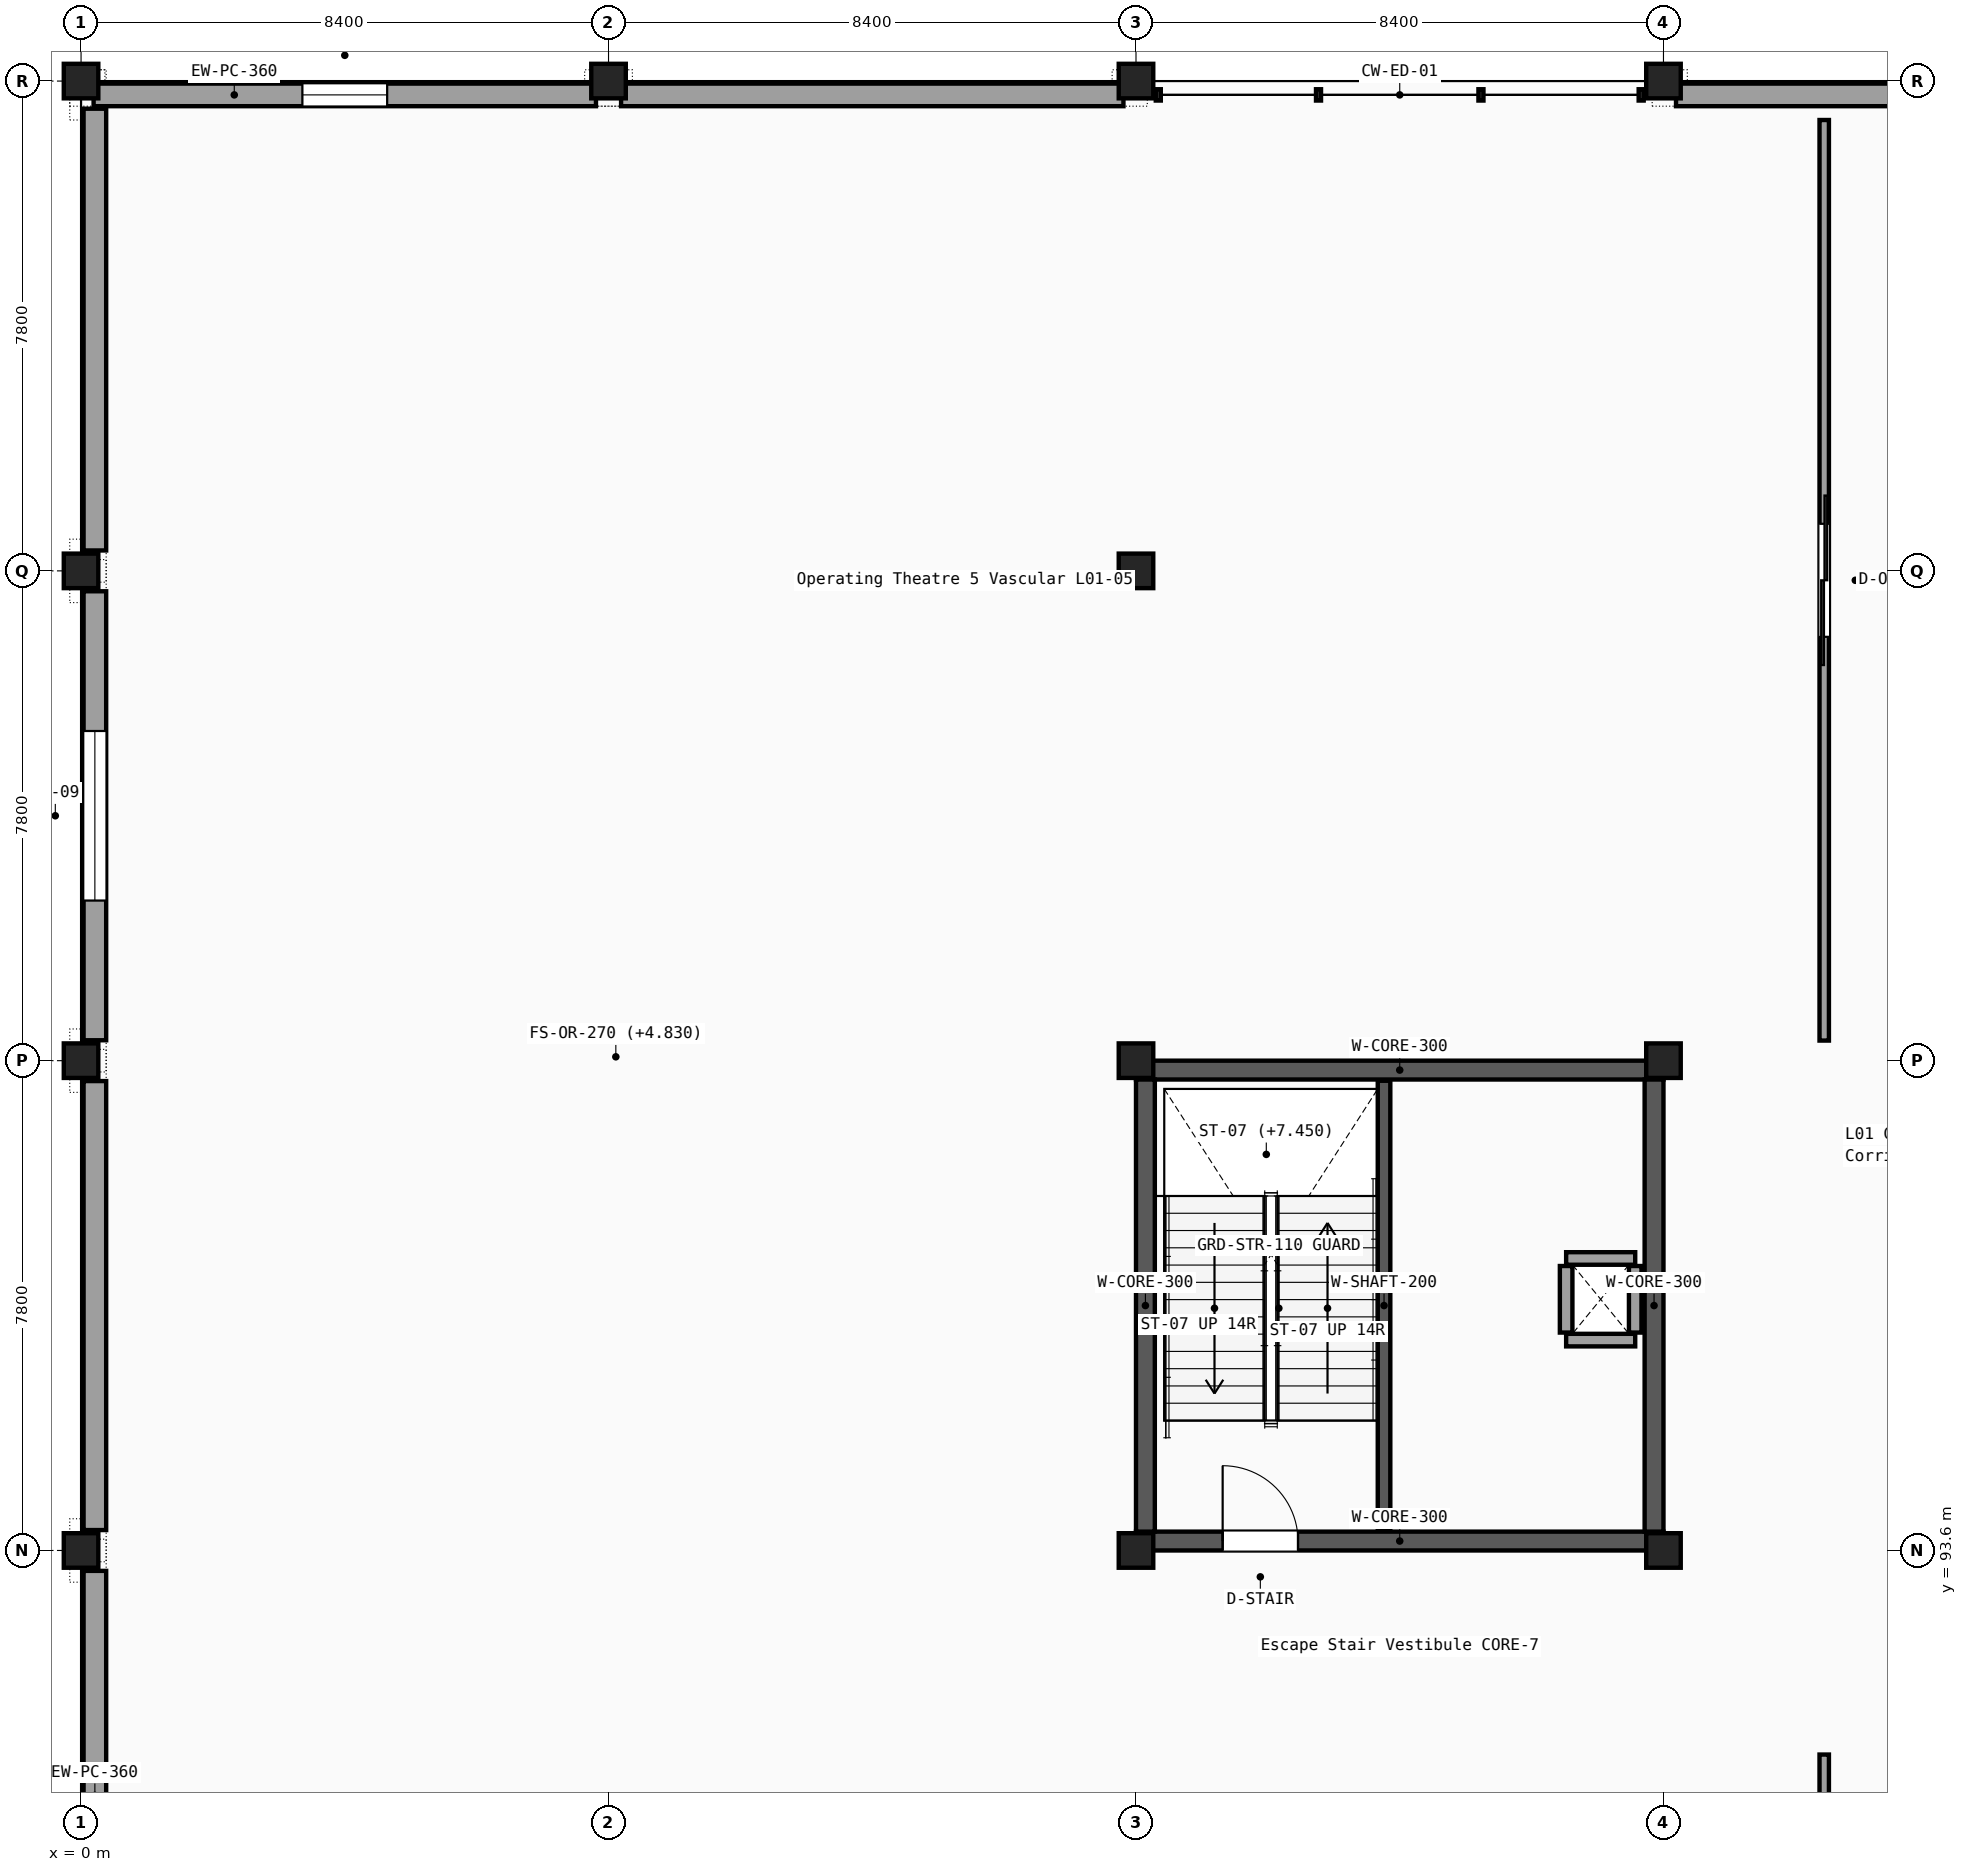
"""IFC4 building model, lengths in metres.
Left out: names, types, materials, properties, quantities, classifications, styles, units other than length and angle.
Written with IfcOpenShell. Run it as: python <this file> out.ifc"""

import sys

from ifc_helpers import new_model, si_unit, direction, frame, frame_2d, origin, origin_2d, place, context, subcontext, project, spatial, rectangle, i_section, extrude, element, fill, save


model = new_model("IFC4")
c1 = context("Model", 3, precision=1e-05, world=origin(), true_north=direction((0.0, 1.0)))
c2 = subcontext(c1, "Body", "Model", "MODEL_VIEW")
j1 = project(units=[si_unit("LENGTHUNIT", "METRE"), si_unit("PLANEANGLEUNIT", "RADIAN")], contexts=[c1])
p1 = place(None, origin())
s1 = spatial("IfcSite", under=j1, at=p1, CompositionType="ELEMENT")
p2 = place(p1, origin())
s2 = spatial("IfcBuilding", under=s1, at=p2, CompositionType="ELEMENT")
p3 = place(p2, frame((0.0, 0.0, 5.1)))
s3 = spatial("IfcBuildingStorey", under=s2, at=p3, CompositionType="ELEMENT", Elevation=5.1)
for number, where, z_axis, x_axis in (
    (1, (0.0, 93.6, 0.0), (0.0, 0.0, 1.0), (1.0, 0.0, 0.0)),
    (2, (0.0, 101.4, 0.0), (0.0, 0.0, 1.0), (1.0, 0.0, 0.0)),
    (3, (0.0, 109.2, 0.0), (0.0, 0.0, 1.0), (1.0, 0.0, 0.0)),
    (4, (0.0, 117.0, 0.0), (0.0, 0.0, 1.0), (1.0, 0.0, 0.0)),
    (5, (8.4, 117.0, 0.0), (0.0, 0.0, 1.0), (1.0, 0.0, 0.0)),
    (6, (16.8, 93.6, 0.0), (0.0, 0.0, 1.0), (1.0, 0.0, 0.0)),
    (7, (16.8, 101.4, 0.0), (0.0, 0.0, 1.0), (1.0, 0.0, 0.0)),
    (8, (16.8, 109.2, 0.0), (0.0, 0.0, 1.0), (1.0, 0.0, 0.0)),
    (9, (16.8, 117.0, 0.0), (0.0, 0.0, 1.0), (1.0, 0.0, 0.0)),
    (10, (25.2, 93.6, 0.0), (0.0, 0.0, 1.0), (1.0, 0.0, 0.0)),
    (11, (25.2, 101.4, 0.0), (0.0, 0.0, 1.0), (1.0, 0.0, 0.0)),
    (12, (25.2, 117.0, 0.0), (0.0, 0.0, 1.0), (1.0, 0.0, 0.0)),
):
    element("IfcColumn", number, at=place(p3, frame(where, z_axis=z_axis, x_axis=x_axis)), inside=s3, PredefinedType="COLUMN", context=c2, shape_type="SweptSolid", body=[
        extrude(i_section(OverallWidth=0.3, OverallDepth=0.55, WebThickness=0.015, FlangeThickness=0.029, FilletRadius=0.027, at=origin_2d()), origin(), (0.0, 0.0, 1.0), 5.1),
    ])
for number, where, z_axis, x_axis in (
    (13, (0.22, 86.125, 0.0), (0.0, 0.0, 1.0), (0.0, 1.0, 0.0)),
    (14, (0.22, 93.925, 0.0), (0.0, 0.0, 1.0), (0.0, 1.0, 0.0)),
):
    element("IfcWall", number, at=place(p3, frame(where, z_axis=z_axis, x_axis=x_axis)), inside=s3, PredefinedType="SOLIDWALL", context=c2, shape_type="SweptSolid", body=[
        extrude(rectangle(XDim=7.15, YDim=0.36, at=frame_2d((3.575, 0.0))), origin(), (0.0, 0.0, 1.0), 4.46),
    ])
p4 = place(p3, frame((0.22, 101.725, 0.0), z_axis=(0.0, 0.0, 1.0), x_axis=(0.0, 1.0, 0.0)))
e15 = element("IfcWall", 15, at=p4, inside=s3, PredefinedType="SOLIDWALL", context=c2, shape_type="SweptSolid", body=[
    extrude(rectangle(XDim=7.15, YDim=0.36, at=frame_2d((3.575, 0.0))), origin(), (0.0, 0.0, 1.0), 4.46),
])
p5 = place(p4, frame((2.225, 0.0, 1.0)))
e16 = element("IfcOpeningElement", 16, at=p5, cuts=e15, PredefinedType="OPENING", context=c2, shape_type="SweptSolid", body=[
    extrude(rectangle(XDim=2.7, YDim=1.45, at=frame_2d((1.35, 0.725))), frame((0.0, 0.19, 0.0), z_axis=(0.0, -1.0, 0.0), x_axis=(1.0, 0.0, 0.0)), (0.0, 0.0, 1.0), 0.38),
])
p6 = place(p3, frame((0.22, 109.525, 0.0), z_axis=(0.0, 0.0, 1.0), x_axis=(0.0, 1.0, 0.0)))
e17 = element("IfcWall", 17, at=p6, inside=s3, PredefinedType="SOLIDWALL", context=c2, shape_type="SweptSolid", body=[
    extrude(rectangle(XDim=7.035, YDim=0.36, at=frame_2d((3.518, 0.0))), origin(), (0.0, 0.0, 1.0), 4.46),
])
p7 = place(p3, frame((0.2, 116.78, 0.0), z_axis=(0.0, 0.0, 1.0), x_axis=(1.0, 0.0, 0.0)))
e18 = element("IfcWall", 18, at=p7, inside=s3, PredefinedType="SOLIDWALL", context=c2, shape_type="SweptSolid", body=[
    extrude(rectangle(XDim=8.0, YDim=0.36, at=frame_2d((4.0, 0.0))), origin(), (0.0, 0.0, 1.0), 4.46),
])
p8 = place(p7, frame((3.325, 0.0, 1.0)))
e19 = element("IfcOpeningElement", 19, at=p8, cuts=e18, PredefinedType="OPENING", context=c2, shape_type="SweptSolid", body=[
    extrude(rectangle(XDim=1.35, YDim=1.45, at=frame_2d((0.675, 0.725))), frame((0.0, 0.19, 0.0), z_axis=(0.0, -1.0, 0.0), x_axis=(1.0, 0.0, 0.0)), (0.0, 0.0, 1.0), 0.38),
])
p9 = place(p3, frame((8.6, 116.78, 0.0), z_axis=(0.0, 0.0, 1.0), x_axis=(1.0, 0.0, 0.0)))
e20 = element("IfcWall", 20, at=p9, inside=s3, PredefinedType="SOLIDWALL", context=c2, shape_type="SweptSolid", body=[
    extrude(rectangle(XDim=8.0, YDim=0.36, at=frame_2d((4.0, 0.0))), origin(), (0.0, 0.0, 1.0), 4.42),
])
p10 = place(p3, frame((25.4, 116.78, 0.0), z_axis=(0.0, 0.0, 1.0), x_axis=(1.0, 0.0, 0.0)))
e21 = element("IfcWall", 21, at=p10, inside=s3, PredefinedType="SOLIDWALL", context=c2, shape_type="SweptSolid", body=[
    extrude(rectangle(XDim=8.0, YDim=0.36, at=frame_2d((4.0, 0.0))), origin(), (0.0, 0.0, 1.0), 4.45),
])
p11 = place(p3, frame((16.8, 93.75, 0.0), z_axis=(0.0, 0.0, 1.0), x_axis=(1.0, 0.0, 0.0)))
e22 = element("IfcWall", 22, at=p11, inside=s3, PredefinedType="SHEAR", context=c2, shape_type="SweptSolid", body=[
    extrude(rectangle(XDim=8.4, YDim=0.3, at=frame_2d((4.2, 0.0))), origin(), (0.0, 0.0, 1.0), 4.83),
])
p12 = place(p11, frame((1.38, 0.0, 0.0)))
e23 = element("IfcOpeningElement", 23, at=p12, cuts=e22, PredefinedType="OPENING", context=c2, shape_type="SweptSolid", body=[
    extrude(rectangle(XDim=1.2, YDim=2.15, at=frame_2d((0.6, 1.075))), frame((0.0, 0.16, 0.0), z_axis=(0.0, -1.0, 0.0), x_axis=(1.0, 0.0, 0.0)), (0.0, 0.0, 1.0), 0.32),
])
p13 = place(p3, frame((16.8, 101.25, 0.0), z_axis=(0.0, 0.0, 1.0), x_axis=(1.0, 0.0, 0.0)))
e24 = element("IfcWall", 24, at=p13, inside=s3, PredefinedType="SHEAR", context=c2, shape_type="SweptSolid", body=[
    extrude(rectangle(XDim=8.4, YDim=0.3, at=frame_2d((4.2, 0.0))), origin(), (0.0, 0.0, 1.0), 4.83),
])
for number, where, z_axis, x_axis in (
    (25, (16.95, 93.9, 0.0), (0.0, 0.0, 1.0), (0.0, 1.0, 0.0)),
    (26, (25.05, 93.9, 0.0), (0.0, 0.0, 1.0), (0.0, 1.0, 0.0)),
):
    element("IfcWall", number, at=place(p3, frame(where, z_axis=z_axis, x_axis=x_axis)), inside=s3, PredefinedType="SHEAR", context=c2, shape_type="SweptSolid", body=[
        extrude(rectangle(XDim=7.2, YDim=0.3, at=frame_2d((3.6, 0.0))), origin(), (0.0, 0.0, 1.0), 4.83),
    ])
p14 = place(p3, frame((20.75, 93.92, 0.0), z_axis=(0.0, 0.0, 1.0), x_axis=(0.0, 1.0, 0.0)))
e27 = element("IfcWall", 27, at=p14, inside=s3, PredefinedType="SHEAR", context=c2, shape_type="SweptSolid", body=[
    extrude(rectangle(XDim=7.16, YDim=0.2, at=frame_2d((3.58, 0.0))), origin(), (0.0, 0.0, 1.0), 4.83),
])
for number, where, z_axis, x_axis in (
    (28, (23.65, 96.95, 0.0), (0.0, 0.0, 1.0), (1.0, 0.0, 0.0)),
    (29, (23.65, 98.25, 0.0), (0.0, 0.0, 1.0), (1.0, 0.0, 0.0)),
):
    element("IfcWall", number, at=place(p3, frame(where, z_axis=z_axis, x_axis=x_axis)), inside=s3, PredefinedType="PARTITIONING", context=c2, shape_type="SweptSolid", body=[
        extrude(rectangle(XDim=1.1, YDim=0.2, at=frame_2d((0.55, 0.0))), origin(), (0.0, 0.0, 1.0), 4.27),
    ])
for number, where, z_axis, x_axis in (
    (30, (23.65, 97.07, 0.0), (0.0, 0.0, 1.0), (0.0, 1.0, 0.0)),
    (31, (24.75, 97.07, 0.0), (0.0, 0.0, 1.0), (0.0, 1.0, 0.0)),
):
    element("IfcWall", number, at=place(p3, frame(where, z_axis=z_axis, x_axis=x_axis)), inside=s3, PredefinedType="PARTITIONING", context=c2, shape_type="SweptSolid", body=[
        extrude(rectangle(XDim=1.06, YDim=0.2, at=frame_2d((0.53, 0.0))), origin(), (0.0, 0.0, 1.0), 4.27),
    ])
p15 = place(p3, frame((27.76, 77.867, 0.0), z_axis=(0.0, 0.0, 1.0), x_axis=(0.0, 1.0, 0.0)))
e32 = element("IfcWall", 32, at=p15, inside=s3, PredefinedType="PARTITIONING", context=c2, shape_type="SweptSolid", body=[
    extrude(rectangle(XDim=12.483, YDim=0.15, at=frame_2d((6.241, 0.0))), origin(), (0.0, 0.0, 1.0), 4.27),
])
p16 = place(p15, frame((5.341, 0.0, 0.0)))
e33 = element("IfcOpeningElement", 33, at=p16, cuts=e32, PredefinedType="OPENING", context=c2, shape_type="SweptSolid", body=[
    extrude(rectangle(XDim=1.8, YDim=2.4, at=frame_2d((0.9, 1.2))), frame((0.0, 0.085, 0.0), z_axis=(0.0, -1.0, 0.0), x_axis=(1.0, 0.0, 0.0)), (0.0, 0.0, 1.0), 0.17),
])
p17 = place(p3, frame((27.76, 101.72, 0.0), z_axis=(0.0, 0.0, 1.0), x_axis=(0.0, 1.0, 0.0)))
e34 = element("IfcWall", 34, at=p17, inside=s3, PredefinedType="PARTITIONING", context=c2, shape_type="SweptSolid", body=[
    extrude(rectangle(XDim=14.66, YDim=0.15, at=frame_2d((7.33, 0.0))), origin(), (0.0, 0.0, 1.0), 4.21),
])
p18 = place(p17, frame((6.43, 0.0, 0.0)))
e35 = element("IfcOpeningElement", 35, at=p18, cuts=e34, PredefinedType="OPENING", context=c2, shape_type="SweptSolid", body=[
    extrude(rectangle(XDim=1.8, YDim=2.4, at=frame_2d((0.9, 1.2))), frame((0.0, 0.085, 0.0), z_axis=(0.0, -1.0, 0.0), x_axis=(1.0, 0.0, 0.0)), (0.0, 0.0, 1.0), 0.17),
])
p19 = place(p5, origin())
e36 = element("IfcWindow", 36, at=p19, inside=s3, PartitioningType="SINGLE_PANEL", PredefinedType="WINDOW", context=c2, shape_type="SweptSolid", body=[
    extrude(rectangle(XDim=2.7, YDim=1.45, at=frame_2d((1.35, 0.725))), frame((0.0, 0.03, 0.0), z_axis=(0.0, -1.0, 0.0), x_axis=(1.0, 0.0, 0.0)), (0.0, 0.0, 1.0), 0.06),
])
fill(e16, e36)
p20 = place(p8, origin())
e37 = element("IfcWindow", 37, at=p20, inside=s3, PartitioningType="SINGLE_PANEL", PredefinedType="WINDOW", context=c2, shape_type="SweptSolid", body=[
    extrude(rectangle(XDim=1.35, YDim=1.45, at=frame_2d((0.675, 0.725))), frame((0.0, 0.03, 0.0), z_axis=(0.0, -1.0, 0.0), x_axis=(1.0, 0.0, 0.0)), (0.0, 0.0, 1.0), 0.06),
])
fill(e19, e37)
p21 = place(p12, origin())
e38 = element("IfcDoor", 38, at=p21, inside=s3, OperationType="SINGLE_SWING_LEFT", PredefinedType="DOOR", context=c2, shape_type="SweptSolid", body=[
    extrude(rectangle(XDim=1.2, YDim=2.15, at=frame_2d((0.6, 1.075))), frame((0.0, 0.025, 0.0), z_axis=(0.0, -1.0, 0.0), x_axis=(1.0, 0.0, 0.0)), (0.0, 0.0, 1.0), 0.05),
])
fill(e23, e38)
p22 = place(p18, origin())
e39 = element("IfcDoor", 39, at=p22, inside=s3, OperationType="DOUBLE_DOOR_SLIDING", PredefinedType="DOOR", context=c2, shape_type="SweptSolid", body=[
    extrude(rectangle(XDim=1.8, YDim=2.4, at=frame_2d((0.9, 1.2))), frame((0.0, 0.025, 0.0), z_axis=(0.0, -1.0, 0.0), x_axis=(1.0, 0.0, 0.0)), (0.0, 0.0, 1.0), 0.05),
])
fill(e35, e39)
save(model, sys.argv[1])
